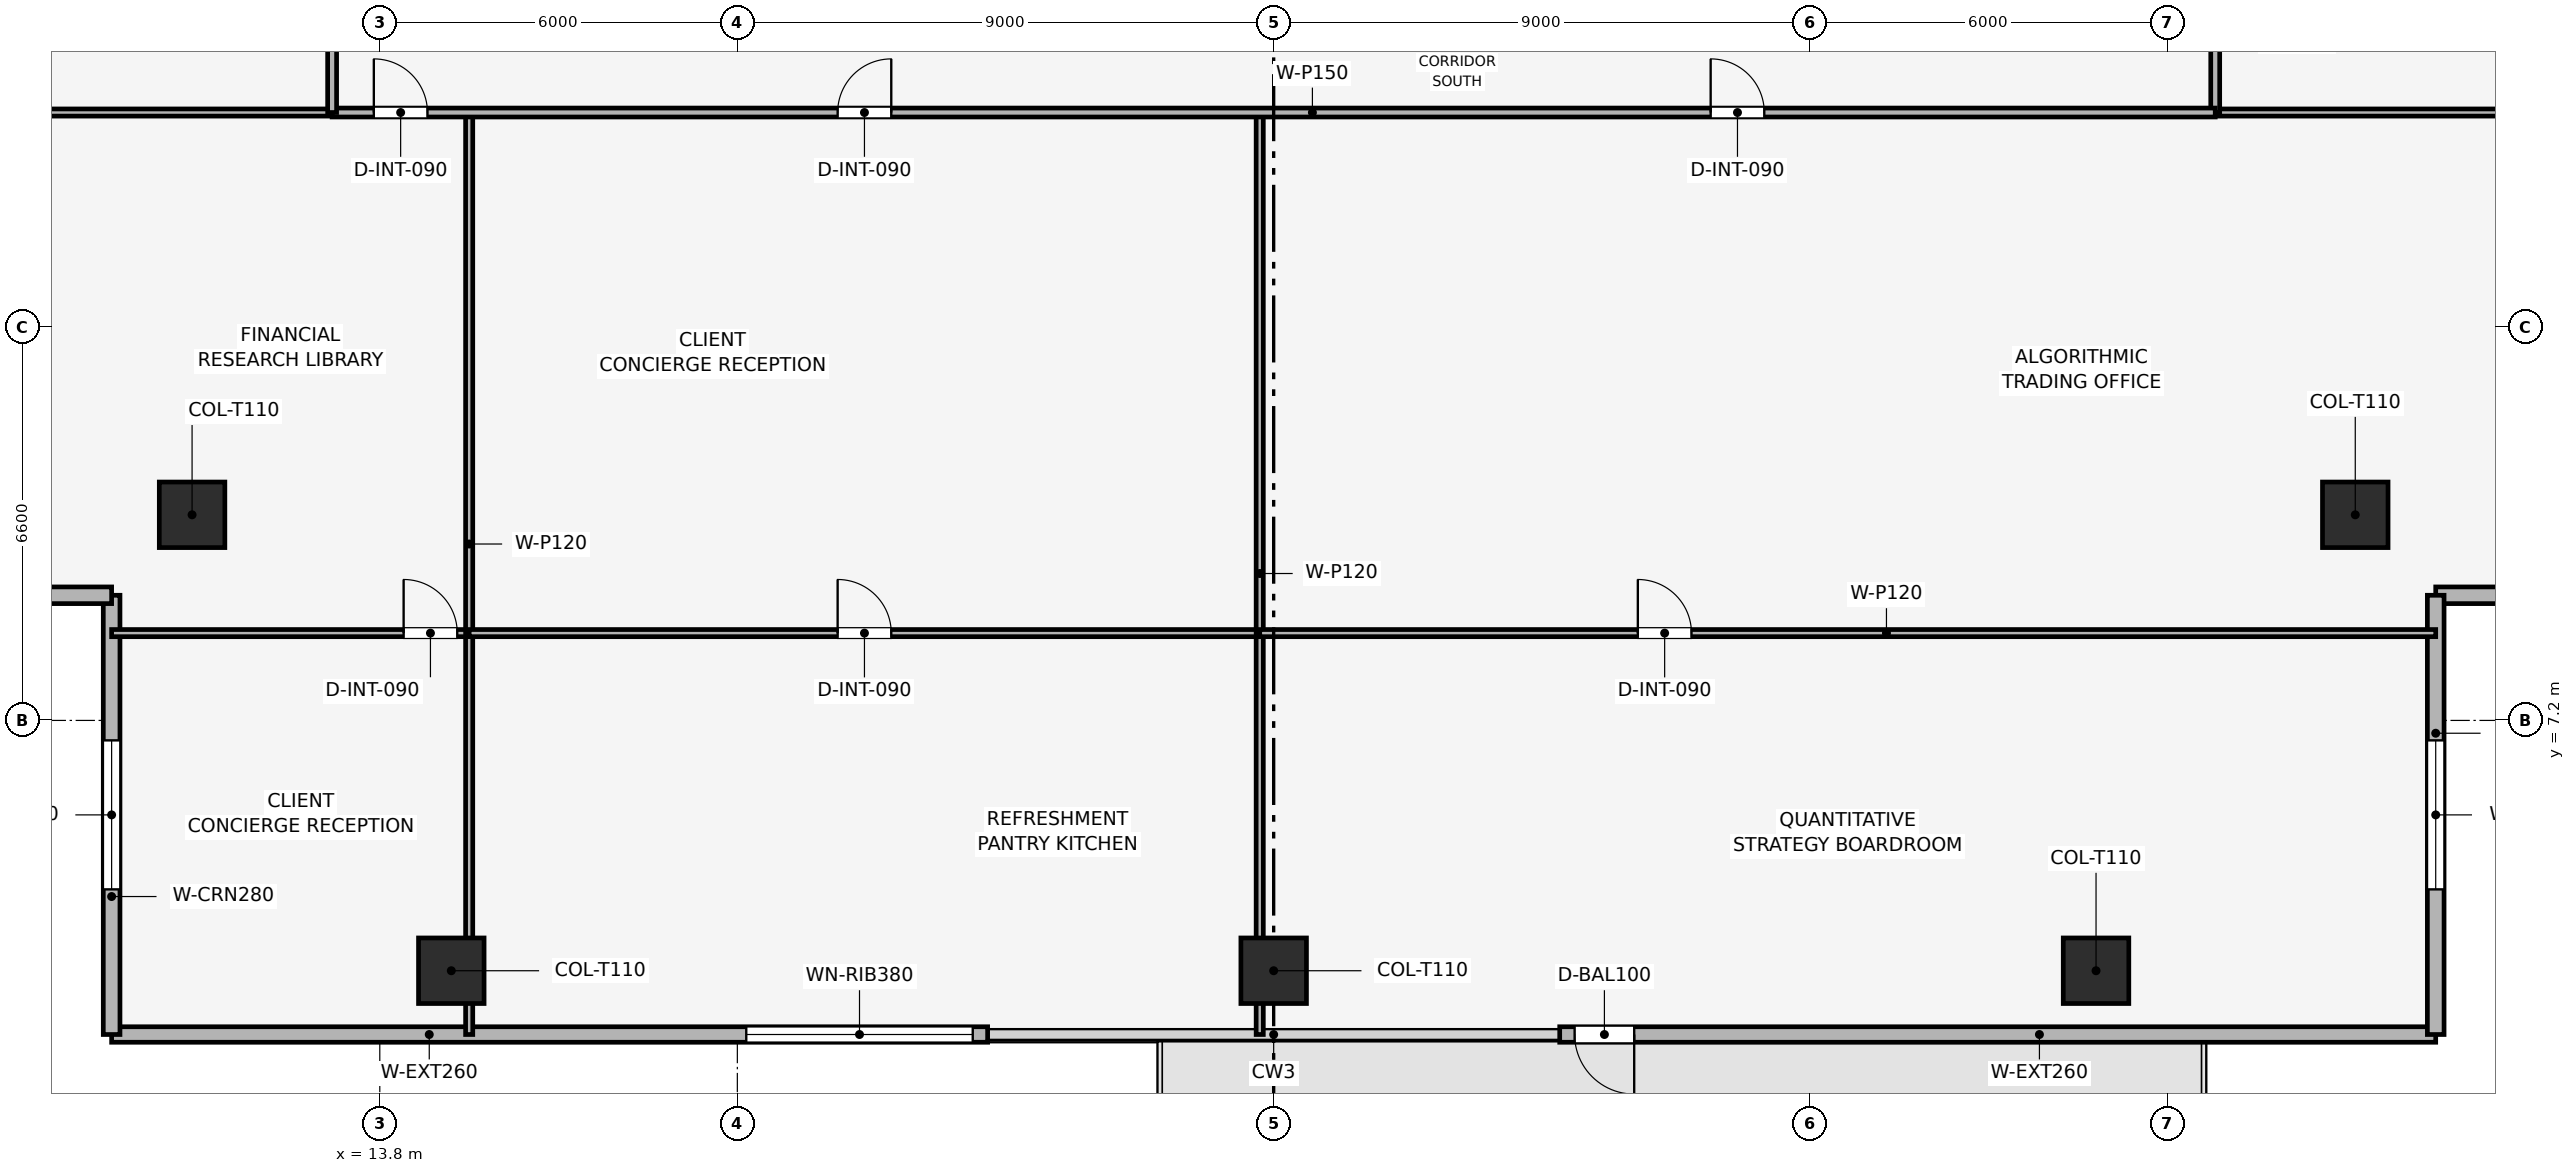
"""IFC4 building model, lengths in metres.
Left out: names, types, materials, properties, quantities, classifications, styles, units other than length and angle.
Written with IfcOpenShell. Run it as: python <this file> out.ifc"""

import sys

from ifc_helpers import new_model, si_unit, direction, frame, frame_2d, origin, origin_2d, place, context, subcontext, project, spatial, rectangle, extrude, element, fill, save


model = new_model("IFC4")
c1 = context("Model", 3, precision=1e-05, world=origin(), true_north=direction((0.0, 1.0)))
c2 = subcontext(c1, "Body", "Model", "MODEL_VIEW")
j1 = project(units=[si_unit("LENGTHUNIT", "METRE"), si_unit("PLANEANGLEUNIT", "RADIAN")], contexts=[c1])
p1 = place(None, origin())
s1 = spatial("IfcSite", under=j1, at=p1, CompositionType="ELEMENT")
p2 = place(p1, origin())
s2 = spatial("IfcBuilding", under=s1, at=p2, CompositionType="ELEMENT")
p3 = place(p2, frame((0.0, 0.0, 211.2)))
s3 = spatial("IfcBuildingStorey", under=s2, at=p3, CompositionType="ELEMENT", Elevation=211.2)
for number, where, z_axis, x_axis in (
    (1, (15.0, 3.0, 0.003), (0.0, 0.0, 1.0), (1.0, 0.0, 0.0)),
    (2, (28.8, 3.0, 0.003), (0.0, 0.0, 1.0), (1.0, 0.0, 0.0)),
    (3, (42.6, 3.0, 0.003), (0.0, 0.0, 1.0), (1.0, 0.0, 0.0)),
    (4, (10.65, 10.65, 0.003), (0.0, 0.0, 1.0), (1.0, 0.0, 0.0)),
    (5, (46.95, 10.65, 0.003), (0.0, 0.0, 1.0), (1.0, 0.0, 0.0)),
):
    element("IfcColumn", number, at=place(p3, frame(where, z_axis=z_axis, x_axis=x_axis)), inside=s3, PredefinedType="COLUMN", context=c2, shape_type="SweptSolid", body=[
        extrude(rectangle(XDim=1.1, YDim=1.1, at=origin_2d()), origin(), (0.0, 0.0, 1.0), 3.494),
    ])
p4 = place(p3, frame((48.3, 1.93, 0.0), z_axis=(0.0, 0.0, 1.0), x_axis=(-1.0, 0.0, 0.0)))
e6 = element("IfcWall", 6, at=p4, inside=s3, PredefinedType="SOLIDWALL", context=c2, shape_type="SweptSolid", body=[
    extrude(rectangle(XDim=14.7, YDim=0.26, at=frame_2d((7.35, 0.0))), origin(), (0.0, 0.0, 1.0), 3.5),
])
p5 = place(p4, frame((13.45, 0.0, 0.0)))
e7 = element("IfcOpeningElement", 7, at=p5, cuts=e6, PredefinedType="OPENING", context=c2, shape_type="SweptSolid", body=[
    extrude(rectangle(XDim=1.0, YDim=2.2, at=frame_2d((0.5, 1.1))), frame((0.0, 0.14, 0.0), z_axis=(0.0, -1.0, 0.0), x_axis=(1.0, 0.0, 0.0)), (0.0, 0.0, 1.0), 0.28),
])
p6 = place(p3, frame((24.0, 1.93, 0.0), z_axis=(0.0, 0.0, 1.0), x_axis=(-1.0, 0.0, 0.0)))
e8 = element("IfcWall", 8, at=p6, inside=s3, PredefinedType="SOLIDWALL", context=c2, shape_type="SweptSolid", body=[
    extrude(rectangle(XDim=14.7, YDim=0.26, at=frame_2d((7.35, 0.0))), origin(), (0.0, 0.0, 1.0), 3.5),
])
p7 = place(p6, frame((0.25, 0.0, 0.9)))
e9 = element("IfcOpeningElement", 9, at=p7, cuts=e8, PredefinedType="OPENING", context=c2, shape_type="SweptSolid", body=[
    extrude(rectangle(XDim=3.8, YDim=1.9, at=frame_2d((1.9, 0.95))), frame((0.0, 0.14, 0.0), z_axis=(0.0, -1.0, 0.0), x_axis=(1.0, 0.0, 0.0)), (0.0, 0.0, 1.0), 0.28),
])
p8 = place(p3, frame((9.3, 1.93, 0.0), z_axis=(0.0, 0.0, 1.0), x_axis=(0.0, 1.0, 0.0)))
e10 = element("IfcWall", 10, at=p8, inside=s3, PredefinedType="SOLIDWALL", context=c2, shape_type="SweptSolid", body=[
    extrude(rectangle(XDim=7.37, YDim=0.28, at=frame_2d((3.685, 0.0))), origin(), (0.0, 0.0, 1.0), 3.5),
])
p9 = place(p8, frame((2.435, 0.0, 0.9)))
e11 = element("IfcOpeningElement", 11, at=p9, cuts=e10, PredefinedType="OPENING", context=c2, shape_type="SweptSolid", body=[
    extrude(rectangle(XDim=2.5, YDim=1.9, at=frame_2d((1.25, 0.95))), frame((0.0, 0.15, 0.0), z_axis=(0.0, -1.0, 0.0), x_axis=(1.0, 0.0, 0.0)), (0.0, 0.0, 1.0), 0.3),
])
p10 = place(p3, frame((9.3, 9.3, 0.0), z_axis=(0.0, 0.0, 1.0), x_axis=(-1.0, 0.0, 0.0)))
e12 = element("IfcWall", 12, at=p10, inside=s3, PredefinedType="SOLIDWALL", context=c2, shape_type="SweptSolid", body=[
    extrude(rectangle(XDim=7.37, YDim=0.28, at=frame_2d((3.685, 0.0))), origin(), (0.0, 0.0, 1.0), 3.5),
])
p11 = place(p10, frame((2.435, 0.0, 0.9)))
e13 = element("IfcOpeningElement", 13, at=p11, cuts=e12, PredefinedType="OPENING", context=c2, shape_type="SweptSolid", body=[
    extrude(rectangle(XDim=2.5, YDim=1.9, at=frame_2d((1.25, 0.95))), frame((0.0, 0.15, 0.0), z_axis=(0.0, -1.0, 0.0), x_axis=(1.0, 0.0, 0.0)), (0.0, 0.0, 1.0), 0.3),
])
p12 = place(p3, frame((55.67, 9.3, 0.0), z_axis=(0.0, 0.0, 1.0), x_axis=(-1.0, 0.0, 0.0)))
e14 = element("IfcWall", 14, at=p12, inside=s3, PredefinedType="SOLIDWALL", context=c2, shape_type="SweptSolid", body=[
    extrude(rectangle(XDim=7.37, YDim=0.28, at=frame_2d((3.685, 0.0))), origin(), (0.0, 0.0, 1.0), 3.5),
])
p13 = place(p12, frame((2.435, 0.0, 0.9)))
e15 = element("IfcOpeningElement", 15, at=p13, cuts=e14, PredefinedType="OPENING", context=c2, shape_type="SweptSolid", body=[
    extrude(rectangle(XDim=2.5, YDim=1.9, at=frame_2d((1.25, 0.95))), frame((0.0, 0.15, 0.0), z_axis=(0.0, -1.0, 0.0), x_axis=(1.0, 0.0, 0.0)), (0.0, 0.0, 1.0), 0.3),
])
p14 = place(p3, frame((48.3, 9.3, 0.0), z_axis=(0.0, 0.0, 1.0), x_axis=(0.0, -1.0, 0.0)))
e16 = element("IfcWall", 16, at=p14, inside=s3, PredefinedType="SOLIDWALL", context=c2, shape_type="SweptSolid", body=[
    extrude(rectangle(XDim=7.37, YDim=0.28, at=frame_2d((3.685, 0.0))), origin(), (0.0, 0.0, 1.0), 3.5),
])
p15 = place(p14, frame((2.435, 0.0, 0.9)))
e17 = element("IfcOpeningElement", 17, at=p15, cuts=e16, PredefinedType="OPENING", context=c2, shape_type="SweptSolid", body=[
    extrude(rectangle(XDim=2.5, YDim=1.9, at=frame_2d((1.25, 0.95))), frame((0.0, 0.15, 0.0), z_axis=(0.0, -1.0, 0.0), x_axis=(1.0, 0.0, 0.0)), (0.0, 0.0, 1.0), 0.3),
])
p16 = place(p3, frame((9.3, 8.665, 0.0), z_axis=(0.0, 0.0, 1.0), x_axis=(1.0, 0.0, 0.0)))
e18 = element("IfcWall", 18, at=p16, inside=s3, PredefinedType="PARTITIONING", context=c2, shape_type="SweptSolid", body=[
    extrude(rectangle(XDim=6.0, YDim=0.12, at=frame_2d((3.0, 0.0))), origin(), (0.0, 0.0, 1.0), 2.885),
])
p17 = place(p16, frame((4.9, 0.0, 0.0)))
e19 = element("IfcOpeningElement", 19, at=p17, cuts=e18, PredefinedType="OPENING", context=c2, shape_type="SweptSolid", body=[
    extrude(rectangle(XDim=0.9, YDim=2.1, at=frame_2d((0.45, 1.05))), frame((0.0, 0.07, 0.0), z_axis=(0.0, -1.0, 0.0), x_axis=(1.0, 0.0, 0.0)), (0.0, 0.0, 1.0), 0.14),
])
p18 = place(p3, frame((15.3, 1.93, 0.0), z_axis=(0.0, 0.0, 1.0), x_axis=(0.0, 1.0, 0.0)))
e20 = element("IfcWall", 20, at=p18, inside=s3, PredefinedType="PARTITIONING", context=c2, shape_type="SweptSolid", body=[
    extrude(rectangle(XDim=15.47, YDim=0.12, at=frame_2d((7.735, 0.0))), origin(), (0.0, 0.0, 1.0), 2.885),
])
p19 = place(p3, frame((15.3, 8.665, 0.0), z_axis=(0.0, 0.0, 1.0), x_axis=(1.0, 0.0, 0.0)))
e21 = element("IfcWall", 21, at=p19, inside=s3, PredefinedType="PARTITIONING", context=c2, shape_type="SweptSolid", body=[
    extrude(rectangle(XDim=13.266, YDim=0.12, at=frame_2d((6.633, 0.0))), origin(), (0.0, 0.0, 1.0), 3.035),
])
p20 = place(p19, frame((6.183, 0.0, 0.0)))
e22 = element("IfcOpeningElement", 22, at=p20, cuts=e21, PredefinedType="OPENING", context=c2, shape_type="SweptSolid", body=[
    extrude(rectangle(XDim=0.9, YDim=2.1, at=frame_2d((0.45, 1.05))), frame((0.0, 0.07, 0.0), z_axis=(0.0, -1.0, 0.0), x_axis=(1.0, 0.0, 0.0)), (0.0, 0.0, 1.0), 0.14),
])
p21 = place(p3, frame((28.566, 1.93, 0.0), z_axis=(0.0, 0.0, 1.0), x_axis=(0.0, 1.0, 0.0)))
e23 = element("IfcWall", 23, at=p21, inside=s3, PredefinedType="PARTITIONING", context=c2, shape_type="SweptSolid", body=[
    extrude(rectangle(XDim=15.47, YDim=0.12, at=frame_2d((7.735, 0.0))), origin(), (0.0, 0.0, 1.0), 2.885),
])
p22 = place(p3, frame((28.566, 8.665, 0.0), z_axis=(0.0, 0.0, 1.0), x_axis=(1.0, 0.0, 0.0)))
e24 = element("IfcWall", 24, at=p22, inside=s3, PredefinedType="PARTITIONING", context=c2, shape_type="SweptSolid", body=[
    extrude(rectangle(XDim=19.734, YDim=0.12, at=frame_2d((9.867, 0.0))), origin(), (0.0, 0.0, 1.0), 2.885),
])
p23 = place(p22, frame((6.345, 0.0, 0.0)))
e25 = element("IfcOpeningElement", 25, at=p23, cuts=e24, PredefinedType="OPENING", context=c2, shape_type="SweptSolid", body=[
    extrude(rectangle(XDim=0.9, YDim=2.1, at=frame_2d((0.45, 1.05))), frame((0.0, 0.07, 0.0), z_axis=(0.0, -1.0, 0.0), x_axis=(1.0, 0.0, 0.0)), (0.0, 0.0, 1.0), 0.14),
])
p24 = place(p3, frame((1.93, 17.4, 0.0), z_axis=(0.0, 0.0, 1.0), x_axis=(1.0, 0.0, 0.0)))
e26 = element("IfcWall", 26, at=p24, inside=s3, PredefinedType="PARTITIONING", context=c2, shape_type="SweptSolid", body=[
    extrude(rectangle(XDim=11.07, YDim=0.12, at=frame_2d((5.535, 0.0))), origin(), (0.0, 0.0, 1.0), 2.885),
])
p25 = place(p3, frame((44.6, 17.4, 0.0), z_axis=(0.0, 0.0, 1.0), x_axis=(1.0, 0.0, 0.0)))
e27 = element("IfcWall", 27, at=p25, inside=s3, PredefinedType="PARTITIONING", context=c2, shape_type="SweptSolid", body=[
    extrude(rectangle(XDim=11.07, YDim=0.12, at=frame_2d((5.535, 0.0))), origin(), (0.0, 0.0, 1.0), 2.885),
])
p26 = place(p3, frame((44.6, 17.4, 0.0), z_axis=(0.0, 0.0, 1.0), x_axis=(0.0, 1.0, 0.0)))
e28 = element("IfcWall", 28, at=p26, inside=s3, PredefinedType="PARTITIONING", context=c2, shape_type="SweptSolid", body=[
    extrude(rectangle(XDim=2.4, YDim=0.15, at=frame_2d((1.2, 0.0))), origin(), (0.0, 0.0, 1.0), 3.5),
])
p27 = place(p3, frame((13.0, 17.4, 0.0), z_axis=(0.0, 0.0, 1.0), x_axis=(1.0, 0.0, 0.0)))
e29 = element("IfcWall", 29, at=p27, inside=s3, PredefinedType="PARTITIONING", context=c2, shape_type="SweptSolid", body=[
    extrude(rectangle(XDim=31.6, YDim=0.15, at=frame_2d((15.8, 0.0))), origin(), (0.0, 0.0, 1.0), 3.035),
])
p28 = place(p27, frame((0.7, 0.0, 0.0)))
e30 = element("IfcOpeningElement", 30, at=p28, cuts=e29, PredefinedType="OPENING", context=c2, shape_type="SweptSolid", body=[
    extrude(rectangle(XDim=0.9, YDim=2.1, at=frame_2d((0.45, 1.05))), frame((0.0, 0.085, 0.0), z_axis=(0.0, -1.0, 0.0), x_axis=(1.0, 0.0, 0.0)), (0.0, 0.0, 1.0), 0.17),
])
p29 = place(p27, frame((8.483, 0.0, 0.0)))
e31 = element("IfcOpeningElement", 31, at=p29, cuts=e29, PredefinedType="OPENING", context=c2, shape_type="SweptSolid", body=[
    extrude(rectangle(XDim=0.9, YDim=2.1, at=frame_2d((0.45, 1.05))), frame((0.0, 0.085, 0.0), z_axis=(0.0, -1.0, 0.0), x_axis=(1.0, 0.0, 0.0)), (0.0, 0.0, 1.0), 0.17),
])
p30 = place(p27, frame((23.133, 0.0, 0.0)))
e32 = element("IfcOpeningElement", 32, at=p30, cuts=e29, PredefinedType="OPENING", context=c2, shape_type="SweptSolid", body=[
    extrude(rectangle(XDim=0.9, YDim=2.1, at=frame_2d((0.45, 1.05))), frame((0.0, 0.085, 0.0), z_axis=(0.0, -1.0, 0.0), x_axis=(1.0, 0.0, 0.0)), (0.0, 0.0, 1.0), 0.17),
])
p31 = place(p3, frame((13.0, 17.4, 0.0), z_axis=(0.0, 0.0, 1.0), x_axis=(0.0, 1.0, 0.0)))
e33 = element("IfcWall", 33, at=p31, inside=s3, PredefinedType="PARTITIONING", context=c2, shape_type="SweptSolid", body=[
    extrude(rectangle(XDim=22.8, YDim=0.15, at=frame_2d((11.4, 0.0))), origin(), (0.0, 0.0, 1.0), 3.035),
])
p32 = place(p31, frame((10.95, 0.0, 0.0)))
e34 = element("IfcOpeningElement", 34, at=p32, cuts=e33, PredefinedType="OPENING", context=c2, shape_type="SweptSolid", body=[
    extrude(rectangle(XDim=0.9, YDim=2.1, at=frame_2d((0.45, 1.05))), frame((0.0, 0.085, 0.0), z_axis=(0.0, -1.0, 0.0), x_axis=(1.0, 0.0, 0.0)), (0.0, 0.0, 1.0), 0.17),
])
p33 = place(p5, origin())
e35 = element("IfcDoor", 35, at=p33, inside=s3, OperationType="SINGLE_SWING_LEFT", PredefinedType="DOOR", context=c2, shape_type="SweptSolid", body=[
    extrude(rectangle(XDim=1.0, YDim=2.2, at=frame_2d((0.5, 1.1))), frame((0.0, 0.025, 0.0), z_axis=(0.0, -1.0, 0.0), x_axis=(1.0, 0.0, 0.0)), (0.0, 0.0, 1.0), 0.05),
])
fill(e7, e35)
p34 = place(p7, origin())
e36 = element("IfcWindow", 36, at=p34, inside=s3, PartitioningType="SINGLE_PANEL", PredefinedType="WINDOW", context=c2, shape_type="SweptSolid", body=[
    extrude(rectangle(XDim=3.8, YDim=1.9, at=frame_2d((1.9, 0.95))), frame((0.0, 0.03, 0.0), z_axis=(0.0, -1.0, 0.0), x_axis=(1.0, 0.0, 0.0)), (0.0, 0.0, 1.0), 0.06),
])
fill(e9, e36)
p35 = place(p9, origin())
e37 = element("IfcWindow", 37, at=p35, inside=s3, PartitioningType="SINGLE_PANEL", PredefinedType="WINDOW", context=c2, shape_type="SweptSolid", body=[
    extrude(rectangle(XDim=2.5, YDim=1.9, at=frame_2d((1.25, 0.95))), frame((0.0, 0.03, 0.0), z_axis=(0.0, -1.0, 0.0), x_axis=(1.0, 0.0, 0.0)), (0.0, 0.0, 1.0), 0.06),
])
fill(e11, e37)
p36 = place(p15, origin())
e38 = element("IfcWindow", 38, at=p36, inside=s3, PartitioningType="SINGLE_PANEL", PredefinedType="WINDOW", context=c2, shape_type="SweptSolid", body=[
    extrude(rectangle(XDim=2.5, YDim=1.9, at=frame_2d((1.25, 0.95))), frame((0.0, 0.03, 0.0), z_axis=(0.0, -1.0, 0.0), x_axis=(1.0, 0.0, 0.0)), (0.0, 0.0, 1.0), 0.06),
])
fill(e17, e38)
p37 = place(p17, origin())
e39 = element("IfcDoor", 39, at=p37, inside=s3, OperationType="SINGLE_SWING_LEFT", PredefinedType="DOOR", context=c2, shape_type="SweptSolid", body=[
    extrude(rectangle(XDim=0.9, YDim=2.1, at=frame_2d((0.45, 1.05))), frame((0.0, 0.025, 0.0), z_axis=(0.0, -1.0, 0.0), x_axis=(1.0, 0.0, 0.0)), (0.0, 0.0, 1.0), 0.05),
])
fill(e19, e39)
p38 = place(p20, origin())
e40 = element("IfcDoor", 40, at=p38, inside=s3, OperationType="SINGLE_SWING_LEFT", PredefinedType="DOOR", context=c2, shape_type="SweptSolid", body=[
    extrude(rectangle(XDim=0.9, YDim=2.1, at=frame_2d((0.45, 1.05))), frame((0.0, 0.025, 0.0), z_axis=(0.0, -1.0, 0.0), x_axis=(1.0, 0.0, 0.0)), (0.0, 0.0, 1.0), 0.05),
])
fill(e22, e40)
p39 = place(p23, origin())
e41 = element("IfcDoor", 41, at=p39, inside=s3, OperationType="SINGLE_SWING_LEFT", PredefinedType="DOOR", context=c2, shape_type="SweptSolid", body=[
    extrude(rectangle(XDim=0.9, YDim=2.1, at=frame_2d((0.45, 1.05))), frame((0.0, 0.025, 0.0), z_axis=(0.0, -1.0, 0.0), x_axis=(1.0, 0.0, 0.0)), (0.0, 0.0, 1.0), 0.05),
])
fill(e25, e41)
p40 = place(p28, origin())
e42 = element("IfcDoor", 42, at=p40, inside=s3, OperationType="SINGLE_SWING_LEFT", PredefinedType="DOOR", context=c2, shape_type="SweptSolid", body=[
    extrude(rectangle(XDim=0.9, YDim=2.1, at=frame_2d((0.45, 1.05))), frame((0.0, 0.025, 0.0), z_axis=(0.0, -1.0, 0.0), x_axis=(1.0, 0.0, 0.0)), (0.0, 0.0, 1.0), 0.05),
])
fill(e30, e42)
p41 = place(p29, origin())
e43 = element("IfcDoor", 43, at=p41, inside=s3, OperationType="SINGLE_SWING_RIGHT", PredefinedType="DOOR", context=c2, shape_type="SweptSolid", body=[
    extrude(rectangle(XDim=0.9, YDim=2.1, at=frame_2d((0.45, 1.05))), frame((0.0, 0.025, 0.0), z_axis=(0.0, -1.0, 0.0), x_axis=(1.0, 0.0, 0.0)), (0.0, 0.0, 1.0), 0.05),
])
fill(e31, e43)
p42 = place(p30, origin())
e44 = element("IfcDoor", 44, at=p42, inside=s3, OperationType="SINGLE_SWING_LEFT", PredefinedType="DOOR", context=c2, shape_type="SweptSolid", body=[
    extrude(rectangle(XDim=0.9, YDim=2.1, at=frame_2d((0.45, 1.05))), frame((0.0, 0.025, 0.0), z_axis=(0.0, -1.0, 0.0), x_axis=(1.0, 0.0, 0.0)), (0.0, 0.0, 1.0), 0.05),
])
fill(e32, e44)
save(model, sys.argv[1])
